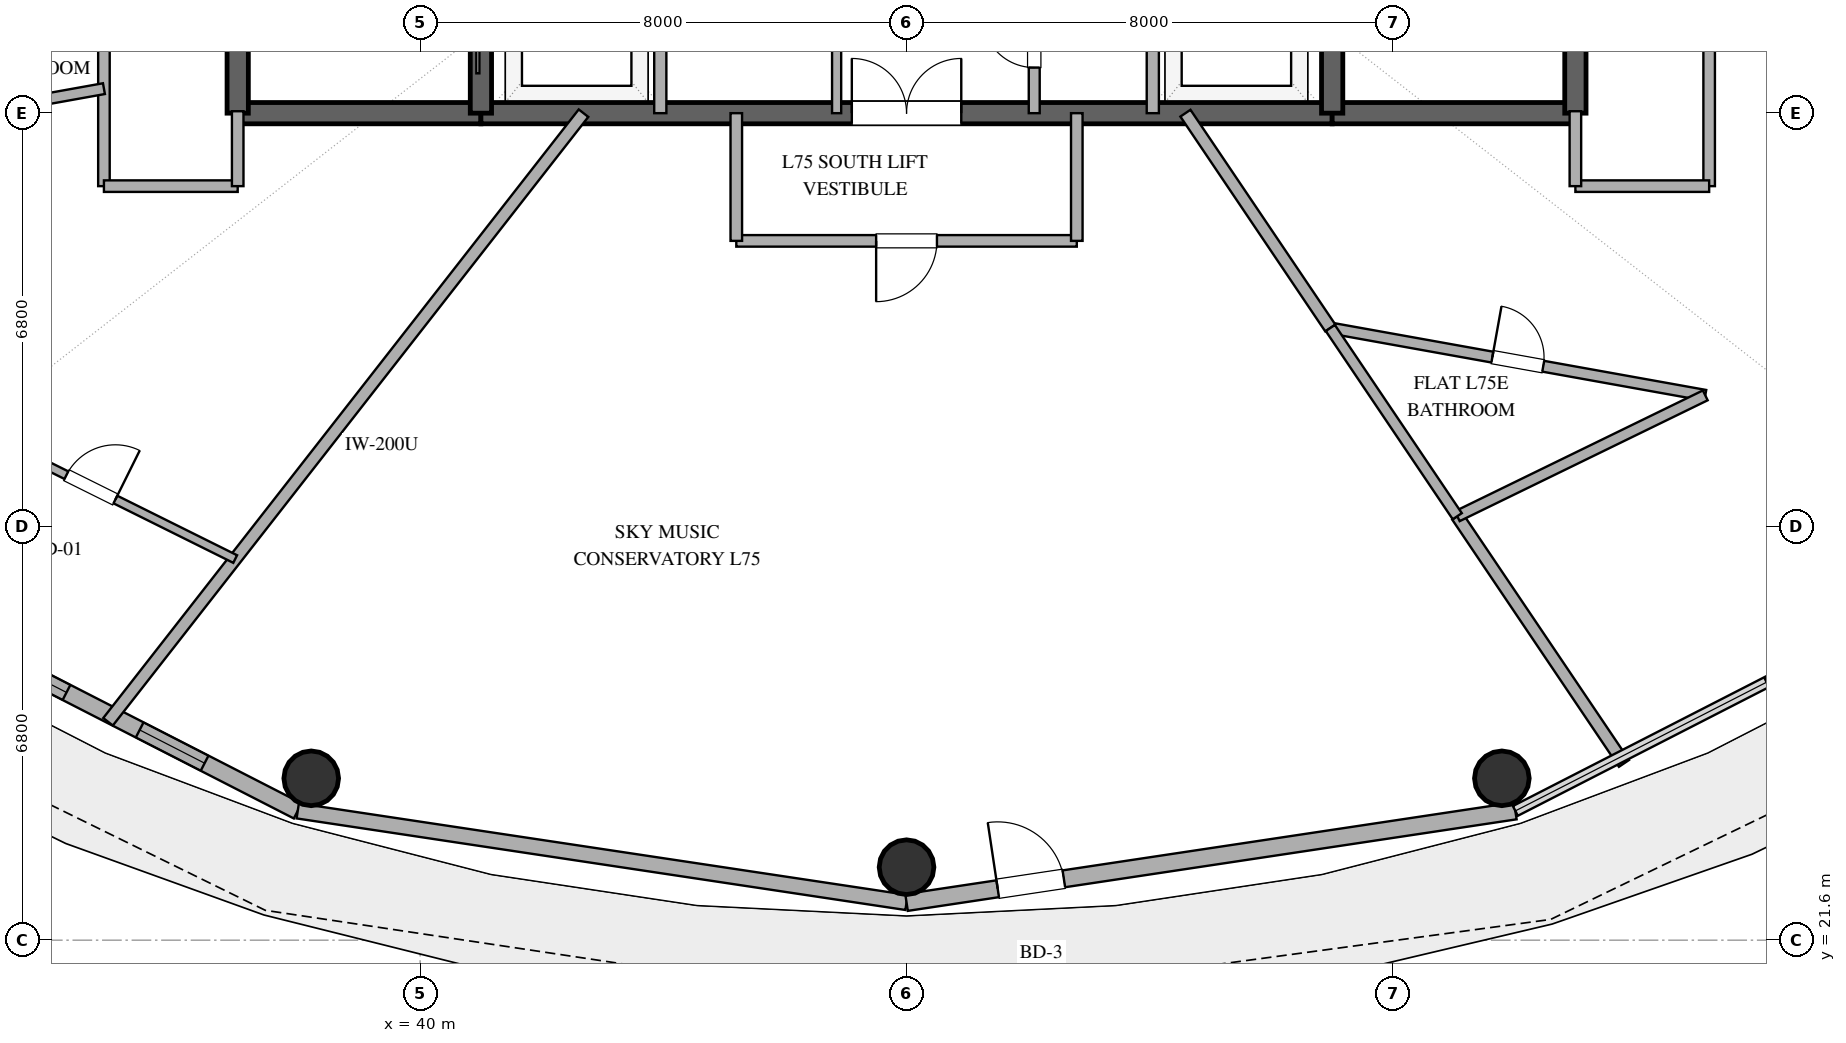
"""IFC4 building model, lengths in metres.
Left out: names, types, materials, properties, quantities, classifications, styles, units other than length and angle.
Written with IfcOpenShell. Run it as: python <this file> out.ifc"""

import sys

from ifc_helpers import new_model, si_unit, direction, frame, frame_2d, origin, origin_2d, place, context, subcontext, project, spatial, rectangle, hollow_circle, extrude, element, fill, save


model = new_model("IFC4")
c1 = context("Model", 3, precision=1e-05, world=origin(), true_north=direction((0.0, 1.0)))
c2 = subcontext(c1, "Body", "Model", "MODEL_VIEW")
j1 = project(units=[si_unit("LENGTHUNIT", "METRE"), si_unit("PLANEANGLEUNIT", "RADIAN")], contexts=[c1])
p1 = place(None, origin())
s1 = spatial("IfcSite", under=j1, at=p1, CompositionType="ELEMENT")
p2 = place(p1, origin())
s2 = spatial("IfcBuilding", under=s1, at=p2, CompositionType="ELEMENT")
p3 = place(p2, frame((0.0, 0.0, 291.0)))
s3 = spatial("IfcBuildingStorey", under=s2, at=p3, CompositionType="ELEMENT", Elevation=291.0)
p4 = place(p3, frame((37.0, 35.2, 0.0), z_axis=(0.0, 0.0, 1.0), x_axis=(1.0, 0.0, 0.0)))
e1 = element("IfcWall", 1, at=p4, inside=s3, PredefinedType="SHEAR", context=c2, shape_type="SweptSolid", body=[
    extrude(rectangle(XDim=4.0, YDim=0.35, at=frame_2d((2.0, 0.0))), origin(), (0.0, 0.0, 1.0), 3.37),
])
p5 = place(p3, frame((41.0, 35.2, 0.0), z_axis=(0.0, 0.0, 1.0), x_axis=(1.0, 0.0, 0.0)))
e2 = element("IfcWall", 2, at=p5, inside=s3, PredefinedType="SHEAR", context=c2, shape_type="SweptSolid", body=[
    extrude(rectangle(XDim=14.0, YDim=0.35, at=frame_2d((7.0, 0.0))), origin(), (0.0, 0.0, 1.0), 3.37),
])
p6 = place(p5, frame((6.1, 0.0, 0.0)))
e3 = element("IfcOpeningElement", 3, at=p6, cuts=e2, PredefinedType="OPENING", context=c2, shape_type="SweptSolid", body=[
    extrude(rectangle(XDim=1.8, YDim=2.25, at=frame_2d((0.9, 1.125))), frame((0.0, 0.185, 0.0), z_axis=(0.0, -1.0, 0.0), x_axis=(1.0, 0.0, 0.0)), (0.0, 0.0, 1.0), 0.37),
])
p7 = place(p3, frame((55.0, 35.2, 0.0), z_axis=(0.0, 0.0, 1.0), x_axis=(1.0, 0.0, 0.0)))
e4 = element("IfcWall", 4, at=p7, inside=s3, PredefinedType="SHEAR", context=c2, shape_type="SweptSolid", body=[
    extrude(rectangle(XDim=4.0, YDim=0.35, at=frame_2d((2.0, 0.0))), origin(), (0.0, 0.0, 1.0), 3.37),
])
p8 = place(p3, frame((37.0, 35.2, 0.0), z_axis=(0.0, 0.0, 1.0), x_axis=(0.0, 1.0, 0.0)))
e5 = element("IfcWall", 5, at=p8, inside=s3, PredefinedType="SHEAR", context=c2, shape_type="SweptSolid", body=[
    extrude(rectangle(XDim=13.6, YDim=0.35, at=frame_2d((6.8, 0.0))), origin(), (0.0, 0.0, 1.0), 3.37),
])
p9 = place(p8, frame((1.5, 0.0, 0.0)))
e6 = element("IfcOpeningElement", 6, at=p9, cuts=e5, PredefinedType="OPENING", context=c2, shape_type="SweptSolid", body=[
    extrude(rectangle(XDim=1.2, YDim=2.15, at=frame_2d((0.6, 1.075))), frame((0.0, 0.185, 0.0), z_axis=(0.0, -1.0, 0.0), x_axis=(1.0, 0.0, 0.0)), (0.0, 0.0, 1.0), 0.37),
])
p10 = place(p3, frame((59.0, 35.2, 0.0), z_axis=(0.0, 0.0, 1.0), x_axis=(0.0, 1.0, 0.0)))
e7 = element("IfcWall", 7, at=p10, inside=s3, PredefinedType="SHEAR", context=c2, shape_type="SweptSolid", body=[
    extrude(rectangle(XDim=13.6, YDim=0.35, at=frame_2d((6.8, 0.0))), origin(), (0.0, 0.0, 1.0), 3.37),
])
p11 = place(p10, frame((1.5, 0.0, 0.0)))
e8 = element("IfcOpeningElement", 8, at=p11, cuts=e7, PredefinedType="OPENING", context=c2, shape_type="SweptSolid", body=[
    extrude(rectangle(XDim=1.2, YDim=2.15, at=frame_2d((0.6, 1.075))), frame((0.0, 0.185, 0.0), z_axis=(0.0, -1.0, 0.0), x_axis=(1.0, 0.0, 0.0)), (0.0, 0.0, 1.0), 0.37),
])
p12 = place(p3, frame((41.0, 35.2, 0.0), z_axis=(0.0, 0.0, 1.0), x_axis=(0.0, 1.0, 0.0)))
e9 = element("IfcWall", 9, at=p12, inside=s3, PredefinedType="SHEAR", context=c2, shape_type="SweptSolid", body=[
    extrude(rectangle(XDim=13.6, YDim=0.35, at=frame_2d((6.8, 0.0))), origin(), (0.0, 0.0, 1.0), 3.37),
])
p13 = place(p12, frame((1.15, 0.0, 0.0)))
e10 = element("IfcOpeningElement", 10, at=p13, cuts=e9, PredefinedType="OPENING", context=c2, shape_type="SweptSolid", body=[
    extrude(rectangle(XDim=1.1, YDim=2.2, at=frame_2d((0.55, 1.1))), frame((0.0, 0.185, 0.0), z_axis=(0.0, -1.0, 0.0), x_axis=(1.0, 0.0, 0.0)), (0.0, 0.0, 1.0), 0.37),
])
p14 = place(p3, frame((55.0, 35.2, 0.0), z_axis=(0.0, 0.0, 1.0), x_axis=(0.0, 1.0, 0.0)))
e11 = element("IfcWall", 11, at=p14, inside=s3, PredefinedType="SHEAR", context=c2, shape_type="SweptSolid", body=[
    extrude(rectangle(XDim=13.6, YDim=0.35, at=frame_2d((6.8, 0.0))), origin(), (0.0, 0.0, 1.0), 3.37),
])
p15 = place(p14, frame((1.15, 0.0, 0.0)))
e12 = element("IfcOpeningElement", 12, at=p15, cuts=e11, PredefinedType="OPENING", context=c2, shape_type="SweptSolid", body=[
    extrude(rectangle(XDim=1.1, YDim=2.2, at=frame_2d((0.55, 1.1))), frame((0.0, 0.185, 0.0), z_axis=(0.0, -1.0, 0.0), x_axis=(1.0, 0.0, 0.0)), (0.0, 0.0, 1.0), 0.37),
])
for number, where, z_axis, x_axis in (
    (13, (38.209, 24.261, 0.0), (0.0, 0.0, 1.0), (1.0, 0.0, 0.0)),
    (14, (48.0, 22.8, 0.0), (0.0, 0.0, 1.0), (1.0, 0.0, 0.0)),
    (15, (57.791, 24.261, 0.0), (0.0, 0.0, 1.0), (1.0, 0.0, 0.0)),
):
    element("IfcColumn", number, at=place(p3, frame(where, z_axis=z_axis, x_axis=x_axis)), inside=s3, PredefinedType="COLUMN", context=c2, shape_type="SweptSolid", body=[
        extrude(hollow_circle(Radius=0.45, WallThickness=0.025, at=origin_2d()), origin(), (0.0, 0.0, 1.0), 3.37),
    ])
p16 = place(p3, frame((29.617, 28.013, 0.0), z_axis=(0.0, 0.0, 1.0), x_axis=(0.890007394051, -0.455946091699, 0.0)))
e16 = element("IfcWall", 16, at=p16, inside=s3, PredefinedType="SOLIDWALL", context=c2, shape_type="SweptSolid", body=[
    extrude(rectangle(XDim=9.404, YDim=0.28, at=frame_2d((4.702, 0.0))), origin(), (0.0, 0.0, 1.0), 3.37),
])
p17 = place(p16, frame((2.154, 0.0, 0.85)))
e17 = element("IfcOpeningElement", 17, at=p17, cuts=e16, PredefinedType="OPENING", context=c2, shape_type="SweptSolid", body=[
    extrude(rectangle(XDim=1.2, YDim=1.8, at=frame_2d((0.6, 0.9))), frame((0.0, 0.15, 0.0), z_axis=(0.0, -1.0, 0.0), x_axis=(1.0, 0.0, 0.0)), (0.0, 0.0, 1.0), 0.3),
])
p18 = place(p16, frame((3.931, 0.0, 0.85)))
e18 = element("IfcOpeningElement", 18, at=p18, cuts=e16, PredefinedType="OPENING", context=c2, shape_type="SweptSolid", body=[
    extrude(rectangle(XDim=1.2, YDim=1.8, at=frame_2d((0.6, 0.9))), frame((0.0, 0.15, 0.0), z_axis=(0.0, -1.0, 0.0), x_axis=(1.0, 0.0, 0.0)), (0.0, 0.0, 1.0), 0.3),
])
p19 = place(p16, frame((6.483, 0.0, 0.85)))
e19 = element("IfcOpeningElement", 19, at=p19, cuts=e16, PredefinedType="OPENING", context=c2, shape_type="SweptSolid", body=[
    extrude(rectangle(XDim=1.2, YDim=1.6, at=frame_2d((0.6, 0.8))), frame((0.0, 0.15, 0.0), z_axis=(0.0, -1.0, 0.0), x_axis=(1.0, 0.0, 0.0)), (0.0, 0.0, 1.0), 0.3),
])
p20 = place(p3, frame((37.987, 23.726, 0.0), z_axis=(0.0, 0.0, 1.0), x_axis=(0.988882522213, -0.148698881169, 0.0)))
e20 = element("IfcWall", 20, at=p20, inside=s3, PredefinedType="SOLIDWALL", context=c2, shape_type="SweptSolid", body=[
    extrude(rectangle(XDim=10.125, YDim=0.25, at=frame_2d((5.062, 0.0))), origin(), (0.0, 0.0, 1.0), 3.37),
])
p21 = place(p3, frame((48.0, 22.22, 0.0), z_axis=(0.0, 0.0, 1.0), x_axis=(0.988882522213, 0.148698881169, 0.0)))
e21 = element("IfcWall", 21, at=p21, inside=s3, PredefinedType="SOLIDWALL", context=c2, shape_type="SweptSolid", body=[
    extrude(rectangle(XDim=10.125, YDim=0.28, at=frame_2d((5.062, 0.0))), origin(), (0.0, 0.0, 1.0), 3.37),
])
p22 = place(p21, frame((1.516, 0.0, 0.0)))
e22 = element("IfcOpeningElement", 22, at=p22, cuts=e21, PredefinedType="OPENING", context=c2, shape_type="SweptSolid", body=[
    extrude(rectangle(XDim=1.1, YDim=2.25, at=frame_2d((0.55, 1.125))), frame((0.0, 0.15, 0.0), z_axis=(0.0, -1.0, 0.0), x_axis=(1.0, 0.0, 0.0)), (0.0, 0.0, 1.0), 0.3),
])
for number, where, z_axis, x_axis in (
    (23, (43.95, 35.2, 0.0), (0.0, 0.0, 1.0), (0.0, 1.0, 0.0)),
    (24, (52.05, 35.2, 0.0), (0.0, 0.0, 1.0), (0.0, 1.0, 0.0)),
):
    element("IfcWall", number, at=place(p3, frame(where, z_axis=z_axis, x_axis=x_axis)), inside=s3, PredefinedType="SOLIDWALL", context=c2, shape_type="SweptSolid", body=[
        extrude(rectangle(XDim=3.2, YDim=0.2, at=frame_2d((1.6, 0.0))), origin(), (0.0, 0.0, 1.0), 2.73),
    ])
p23 = place(p3, frame((46.85, 35.2, 0.0), z_axis=(0.0, 0.0, 1.0), x_axis=(0.0, 1.0, 0.0)))
e25 = element("IfcWall", 25, at=p23, inside=s3, PredefinedType="PARTITIONING", context=c2, shape_type="SweptSolid", body=[
    extrude(rectangle(XDim=3.2, YDim=0.15, at=frame_2d((1.6, 0.0))), origin(), (0.0, 0.0, 1.0), 2.73),
])
p24 = place(p23, frame((1.15, 0.0, 0.0)))
e26 = element("IfcOpeningElement", 26, at=p24, cuts=e25, PredefinedType="OPENING", context=c2, shape_type="SweptSolid", body=[
    extrude(rectangle(XDim=0.9, YDim=2.15, at=frame_2d((0.45, 1.075))), frame((0.0, 0.085, 0.0), z_axis=(0.0, -1.0, 0.0), x_axis=(1.0, 0.0, 0.0)), (0.0, 0.0, 1.0), 0.17),
])
p25 = place(p3, frame((50.1, 35.2, 0.0), z_axis=(0.0, 0.0, 1.0), x_axis=(0.0, 1.0, 0.0)))
e27 = element("IfcWall", 27, at=p25, inside=s3, PredefinedType="PLUMBINGWALL", context=c2, shape_type="SweptSolid", body=[
    extrude(rectangle(XDim=2.45, YDim=0.18, at=frame_2d((1.225, 0.0))), origin(), (0.0, 0.0, 1.0), 2.73),
])
p26 = place(p25, frame((0.75, 0.0, 0.0)))
e28 = element("IfcOpeningElement", 28, at=p26, cuts=e27, PredefinedType="OPENING", context=c2, shape_type="SweptSolid", body=[
    extrude(rectangle(XDim=0.85, YDim=2.1, at=frame_2d((0.425, 1.05))), frame((0.0, 0.1, 0.0), z_axis=(0.0, -1.0, 0.0), x_axis=(1.0, 0.0, 0.0)), (0.0, 0.0, 1.0), 0.2),
])
p27 = place(p3, frame((61.2, 50.9, 0.0), z_axis=(0.0, 0.0, 1.0), x_axis=(0.0, -1.0, 0.0)))
e29 = element("IfcWall", 29, at=p27, inside=s3, PredefinedType="PARTITIONING", context=c2, shape_type="SweptSolid", body=[
    extrude(rectangle(XDim=16.9, YDim=0.19, at=frame_2d((8.45, 0.0))), origin(), (0.0, 0.0, 1.0), 2.73),
])
p28 = place(p27, frame((8.873, 0.0, 0.0)))
e30 = element("IfcOpeningElement", 30, at=p28, cuts=e29, PredefinedType="OPENING", context=c2, shape_type="SweptSolid", body=[
    extrude(rectangle(XDim=1.0, YDim=2.2, at=frame_2d((0.5, 1.1))), frame((0.0, 0.105, 0.0), z_axis=(0.0, -1.0, 0.0), x_axis=(1.0, 0.0, 0.0)), (0.0, 0.0, 1.0), 0.21),
])
p29 = place(p3, frame((42.687, 35.2, 0.0), z_axis=(0.0, 0.0, 1.0), x_axis=(-0.615663811723, -0.788008928208, 0.0)))
e31 = element("IfcWall", 31, at=p29, inside=s3, PredefinedType="PARTITIONING", context=c2, shape_type="SweptSolid", body=[
    extrude(rectangle(XDim=12.701, YDim=0.2, at=frame_2d((6.351, 0.0))), origin(), (0.0, 0.0, 1.0), 2.73),
])
p30 = place(p3, frame((34.8, 34.0, 0.0), z_axis=(0.0, 0.0, 1.0), x_axis=(0.0, 1.0, 0.0)))
e32 = element("IfcWall", 32, at=p30, inside=s3, PredefinedType="PARTITIONING", context=c2, shape_type="SweptSolid", body=[
    extrude(rectangle(XDim=16.9, YDim=0.19, at=frame_2d((8.45, 0.0))), origin(), (0.0, 0.0, 1.0), 2.73),
])
p31 = place(p30, frame((7.627, 0.0, 0.0)))
e33 = element("IfcOpeningElement", 33, at=p31, cuts=e32, PredefinedType="OPENING", context=c2, shape_type="SweptSolid", body=[
    extrude(rectangle(XDim=1.0, YDim=2.2, at=frame_2d((0.5, 1.1))), frame((0.0, 0.105, 0.0), z_axis=(0.0, -1.0, 0.0), x_axis=(1.0, 0.0, 0.0)), (0.0, 0.0, 1.0), 0.21),
])
p32 = place(p3, frame((54.97, 31.667, 0.0), z_axis=(0.0, 0.0, 1.0), x_axis=(0.98424617738, -0.176803456736, 0.0)))
e34 = element("IfcWall", 34, at=p32, inside=s3, PredefinedType="PLUMBINGWALL", context=c2, shape_type="SweptSolid", body=[
    extrude(rectangle(XDim=6.265, YDim=0.18, at=frame_2d((3.132, 0.0))), origin(), (0.0, 0.0, 1.0), 2.73),
])
p33 = place(p32, frame((2.708, 0.0, 0.0)))
e35 = element("IfcOpeningElement", 35, at=p33, cuts=e34, PredefinedType="OPENING", context=c2, shape_type="SweptSolid", body=[
    extrude(rectangle(XDim=0.85, YDim=2.1, at=frame_2d((0.425, 1.05))), frame((0.0, 0.1, 0.0), z_axis=(0.0, -1.0, 0.0), x_axis=(1.0, 0.0, 0.0)), (0.0, 0.0, 1.0), 0.2),
])
p34 = place(p3, frame((34.8, 37.964, 0.0), z_axis=(0.0, 0.0, 1.0), x_axis=(-0.956308169094, -0.292360540641, 0.0)))
e36 = element("IfcWall", 36, at=p34, inside=s3, PredefinedType="PLUMBINGWALL", context=c2, shape_type="SweptSolid", body=[
    extrude(rectangle(XDim=6.028, YDim=0.18, at=frame_2d((3.014, 0.0))), origin(), (0.0, 0.0, 1.0), 2.73),
])
p35 = place(p34, frame((2.589, 0.0, 0.0)))
e37 = element("IfcOpeningElement", 37, at=p35, cuts=e36, PredefinedType="OPENING", context=c2, shape_type="SweptSolid", body=[
    extrude(rectangle(XDim=0.85, YDim=2.1, at=frame_2d((0.425, 1.05))), frame((0.0, 0.1, 0.0), z_axis=(0.0, -1.0, 0.0), x_axis=(1.0, 0.0, 0.0)), (0.0, 0.0, 1.0), 0.2),
])
p36 = place(p3, frame((50.8, 33.1, 0.0), z_axis=(0.0, 0.0, 1.0), x_axis=(-1.0, 0.0, 0.0)))
e38 = element("IfcWall", 38, at=p36, inside=s3, PredefinedType="PARTITIONING", context=c2, shape_type="SweptSolid", body=[
    extrude(rectangle(XDim=5.6, YDim=0.19, at=frame_2d((2.8, 0.0))), origin(), (0.0, 0.0, 1.0), 2.73),
])
p37 = place(p36, frame((2.3, 0.0, 0.0)))
e39 = element("IfcOpeningElement", 39, at=p37, cuts=e38, PredefinedType="OPENING", context=c2, shape_type="SweptSolid", body=[
    extrude(rectangle(XDim=1.0, YDim=2.2, at=frame_2d((0.5, 1.1))), frame((0.0, 0.105, 0.0), z_axis=(0.0, -1.0, 0.0), x_axis=(1.0, 0.0, 0.0)), (0.0, 0.0, 1.0), 0.21),
])
p38 = place(p3, frame((32.212, 30.226, 0.0), z_axis=(0.0, 0.0, 1.0), x_axis=(0.895575883974, -0.444908795197, 0.0)))
e40 = element("IfcWall", 40, at=p38, inside=s3, PredefinedType="PARTITIONING", context=c2, shape_type="SweptSolid", body=[
    extrude(rectangle(XDim=5.3, YDim=0.14, at=frame_2d((2.65, 0.0))), origin(), (0.0, 0.0, 1.0), 2.73),
])
p39 = place(p38, frame((2.2, 0.0, 0.0)))
e41 = element("IfcOpeningElement", 41, at=p39, cuts=e40, PredefinedType="OPENING", context=c2, shape_type="SweptSolid", body=[
    extrude(rectangle(XDim=0.9, YDim=2.1, at=frame_2d((0.45, 1.05))), frame((0.0, 0.08, 0.0), z_axis=(0.0, -1.0, 0.0), x_axis=(1.0, 0.0, 0.0)), (0.0, 0.0, 1.0), 0.16),
])
p40 = place(p3, frame((59.799, 24.507, 0.0), z_axis=(0.0, 0.0, 1.0), x_axis=(-0.559196589516, 0.829035086274, 0.0)))
e42 = element("IfcWall", 42, at=p40, inside=s3, PredefinedType="PARTITIONING", context=c2, shape_type="SweptSolid", body=[
    extrude(rectangle(XDim=4.903, YDim=0.2, at=frame_2d((2.451, 0.0))), origin(), (0.0, 0.0, 1.0), 2.73),
])
p41 = place(p3, frame((30.265, 34.789, 0.0), z_axis=(0.0, 0.0, 1.0), x_axis=(0.984250881723, 0.176777266148, 0.0)))
e43 = element("IfcWall", 43, at=p41, inside=s3, PredefinedType="PLUMBINGWALL", context=c2, shape_type="SweptSolid", body=[
    extrude(rectangle(XDim=4.607, YDim=0.18, at=frame_2d((2.304, 0.0))), origin(), (0.0, 0.0, 1.0), 2.73),
])
p42 = place(p3, frame((61.136, 30.559, 0.0), z_axis=(0.0, 0.0, 1.0), x_axis=(-0.898933361371, -0.438085393291, 0.0)))
e44 = element("IfcWall", 44, at=p42, inside=s3, PredefinedType="PLUMBINGWALL", context=c2, shape_type="SweptSolid", body=[
    extrude(rectangle(XDim=4.537, YDim=0.18, at=frame_2d((2.269, 0.0))), origin(), (0.0, 0.0, 1.0), 2.73),
])
p43 = place(p3, frame((54.97, 31.667, 0.0), z_axis=(0.0, 0.0, 1.0), x_axis=(-0.559200276542, 0.829032599308, 0.0)))
e45 = element("IfcWall", 45, at=p43, inside=s3, PredefinedType="PARTITIONING", context=c2, shape_type="SweptSolid", body=[
    extrude(rectangle(XDim=4.261, YDim=0.2, at=frame_2d((2.131, 0.0))), origin(), (0.0, 0.0, 1.0), 2.73),
])
p44 = place(p3, frame((57.058, 28.572, 0.0), z_axis=(0.0, 0.0, 1.0), x_axis=(-0.559219016168, 0.82901995872, 0.0)))
e46 = element("IfcWall", 46, at=p44, inside=s3, PredefinedType="PLUMBINGWALL", context=c2, shape_type="SweptSolid", body=[
    extrude(rectangle(XDim=3.734, YDim=0.18, at=frame_2d((1.867, 0.0))), origin(), (0.0, 0.0, 1.0), 2.73),
])
for number, where, z_axis, x_axis in (
    (47, (37.0, 34.0, 0.0), (0.0, 0.0, 1.0), (-1.0, 0.0, 0.0)),
    (48, (61.2, 34.0, 0.0), (0.0, 0.0, 1.0), (-1.0, 0.0, 0.0)),
):
    element("IfcWall", number, at=place(p3, frame(where, z_axis=z_axis, x_axis=x_axis)), inside=s3, PredefinedType="PARTITIONING", context=c2, shape_type="SweptSolid", body=[
        extrude(rectangle(XDim=2.2, YDim=0.19, at=frame_2d((1.1, 0.0))), origin(), (0.0, 0.0, 1.0), 2.73),
    ])
for number, where, z_axis, x_axis in (
    (49, (50.8, 35.2, 0.0), (0.0, 0.0, 1.0), (0.0, -1.0, 0.0)),
    (50, (45.2, 33.1, 0.0), (0.0, 0.0, 1.0), (0.0, 1.0, 0.0)),
):
    element("IfcWall", number, at=place(p3, frame(where, z_axis=z_axis, x_axis=x_axis)), inside=s3, PredefinedType="PARTITIONING", context=c2, shape_type="SweptSolid", body=[
        extrude(rectangle(XDim=2.1, YDim=0.19, at=frame_2d((1.05, 0.0))), origin(), (0.0, 0.0, 1.0), 2.73),
    ])
for number, where, z_axis, x_axis in (
    (51, (37.0, 35.232, 0.0), (0.0, 0.0, 1.0), (0.0, -1.0, 0.0)),
    (52, (59.0, 34.0, 0.0), (0.0, 0.0, 1.0), (0.0, 1.0, 0.0)),
):
    element("IfcWall", number, at=place(p3, frame(where, z_axis=z_axis, x_axis=x_axis)), inside=s3, PredefinedType="PARTITIONING", context=c2, shape_type="SweptSolid", body=[
        extrude(rectangle(XDim=1.232, YDim=0.19, at=frame_2d((0.616, 0.0))), origin(), (0.0, 0.0, 1.0), 2.73),
    ])
p45 = place(p18, origin())
e53 = element("IfcWindow", 53, at=p45, inside=s3, PartitioningType="SINGLE_PANEL", PredefinedType="WINDOW", context=c2, shape_type="SweptSolid", body=[
    extrude(rectangle(XDim=1.2, YDim=1.8, at=frame_2d((0.6, 0.9))), frame((0.0, 0.03, 0.0), z_axis=(0.0, -1.0, 0.0), x_axis=(1.0, 0.0, 0.0)), (0.0, 0.0, 1.0), 0.06),
])
fill(e18, e53)
p46 = place(p19, origin())
e54 = element("IfcWindow", 54, at=p46, inside=s3, PartitioningType="SINGLE_PANEL", PredefinedType="WINDOW", context=c2, shape_type="SweptSolid", body=[
    extrude(rectangle(XDim=1.2, YDim=1.6, at=frame_2d((0.6, 0.8))), frame((0.0, 0.03, 0.0), z_axis=(0.0, -1.0, 0.0), x_axis=(1.0, 0.0, 0.0)), (0.0, 0.0, 1.0), 0.06),
])
fill(e19, e54)
p47 = place(p22, origin())
e55 = element("IfcDoor", 55, at=p47, inside=s3, OperationType="SINGLE_SWING_LEFT", PredefinedType="DOOR", context=c2, shape_type="SweptSolid", body=[
    extrude(rectangle(XDim=1.1, YDim=2.25, at=frame_2d((0.55, 1.125))), frame((0.0, 0.025, 0.0), z_axis=(0.0, -1.0, 0.0), x_axis=(1.0, 0.0, 0.0)), (0.0, 0.0, 1.0), 0.05),
])
fill(e22, e55)
p48 = place(p6, origin())
e56 = element("IfcDoor", 56, at=p48, inside=s3, OperationType="DOUBLE_DOOR_SINGLE_SWING", PredefinedType="DOOR", context=c2, shape_type="SweptSolid", body=[
    extrude(rectangle(XDim=1.8, YDim=2.25, at=frame_2d((0.9, 1.125))), frame((0.0, 0.025, 0.0), z_axis=(0.0, -1.0, 0.0), x_axis=(1.0, 0.0, 0.0)), (0.0, 0.0, 1.0), 0.05),
])
fill(e3, e56)
p49 = place(p26, origin())
e57 = element("IfcDoor", 57, at=p49, inside=s3, OperationType="SINGLE_SWING_RIGHT", PredefinedType="DOOR", context=c2, shape_type="SweptSolid", body=[
    extrude(rectangle(XDim=0.85, YDim=2.1, at=frame_2d((0.425, 1.05))), frame((0.0, 0.025, 0.0), z_axis=(0.0, -1.0, 0.0), x_axis=(1.0, 0.0, 0.0)), (0.0, 0.0, 1.0), 0.05),
])
fill(e28, e57)
p50 = place(p33, origin())
e58 = element("IfcDoor", 58, at=p50, inside=s3, OperationType="SINGLE_SWING_LEFT", PredefinedType="DOOR", context=c2, shape_type="SweptSolid", body=[
    extrude(rectangle(XDim=0.85, YDim=2.1, at=frame_2d((0.425, 1.05))), frame((0.0, 0.025, 0.0), z_axis=(0.0, -1.0, 0.0), x_axis=(1.0, 0.0, 0.0)), (0.0, 0.0, 1.0), 0.05),
])
fill(e35, e58)
p51 = place(p37, origin())
e59 = element("IfcDoor", 59, at=p51, inside=s3, OperationType="SINGLE_SWING_RIGHT", PredefinedType="DOOR", context=c2, shape_type="SweptSolid", body=[
    extrude(rectangle(XDim=1.0, YDim=2.2, at=frame_2d((0.5, 1.1))), frame((0.0, 0.025, 0.0), z_axis=(0.0, -1.0, 0.0), x_axis=(1.0, 0.0, 0.0)), (0.0, 0.0, 1.0), 0.05),
])
fill(e39, e59)
p52 = place(p39, origin())
e60 = element("IfcDoor", 60, at=p52, inside=s3, OperationType="SINGLE_SWING_RIGHT", PredefinedType="DOOR", context=c2, shape_type="SweptSolid", body=[
    extrude(rectangle(XDim=0.9, YDim=2.1, at=frame_2d((0.45, 1.05))), frame((0.0, 0.025, 0.0), z_axis=(0.0, -1.0, 0.0), x_axis=(1.0, 0.0, 0.0)), (0.0, 0.0, 1.0), 0.05),
])
fill(e41, e60)
save(model, sys.argv[1])
